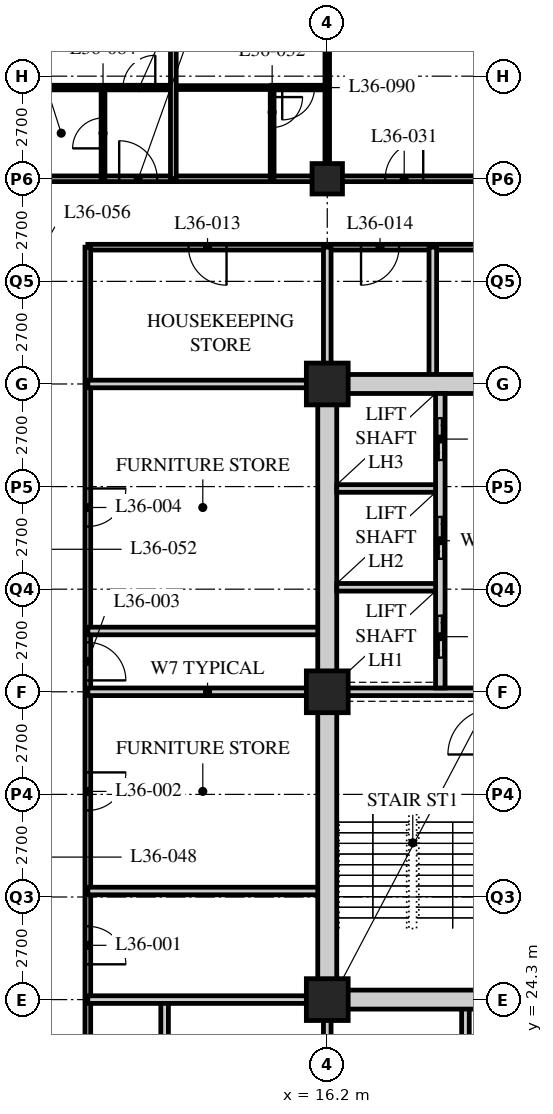
"""IFC4 building model, lengths in metres.
Left out: names, types, materials, properties, quantities, classifications, styles, units other than length and angle.
Written with IfcOpenShell. Run it as: python <this file> out.ifc"""

import sys

from ifc_helpers import new_model, si_unit, direction, frame, frame_2d, origin, origin_2d, place, context, subcontext, project, spatial, rectangle, hollow_rectangle, extrude, element, fill, save


model = new_model("IFC4")
c1 = context("Model", 3, precision=1e-05, world=origin(), true_north=direction((0.0, 1.0)))
c2 = subcontext(c1, "Body", "Model", "MODEL_VIEW")
j1 = project(units=[si_unit("LENGTHUNIT", "METRE"), si_unit("PLANEANGLEUNIT", "RADIAN")], contexts=[c1])
p1 = place(None, origin())
s1 = spatial("IfcSite", under=j1, at=p1, CompositionType="ELEMENT")
p2 = place(p1, origin())
s2 = spatial("IfcBuilding", under=s1, at=p2, CompositionType="ELEMENT")
p3 = place(p2, frame((0.0, 0.0, 140.8)))
s3 = spatial("IfcBuildingStorey", under=s2, at=p3, CompositionType="ELEMENT", Elevation=140.8)
for number, where, z_axis, x_axis in (
    (1, (16.2, 24.3, 0.0), (0.0, 0.0, 1.0), (1.0, 0.0, 0.0)),
    (2, (16.2, 32.4, 0.0), (0.0, 0.0, 1.0), (1.0, 0.0, 0.0)),
    (3, (16.2, 40.5, 0.0), (0.0, 0.0, 1.0), (1.0, 0.0, 0.0)),
):
    element("IfcColumn", number, at=place(p3, frame(where, z_axis=z_axis, x_axis=x_axis)), inside=s3, PredefinedType="COLUMN", context=c2, shape_type="SweptSolid", body=[
        extrude(hollow_rectangle(XDim=1.1, YDim=1.1, WallThickness=0.1, at=origin_2d()), origin(), (0.0, 0.0, 1.0), 3.4),
    ])
p4 = place(p3, frame((16.2, 45.9, 0.0), z_axis=(0.0, 0.0, 1.0), x_axis=(1.0, 0.0, 0.0)))
e4 = element("IfcColumn", 4, at=p4, inside=s3, PredefinedType="COLUMN", context=c2, shape_type="SweptSolid", body=[
    extrude(hollow_rectangle(XDim=0.8, YDim=0.8, WallThickness=0.08, at=origin_2d()), origin(), (0.0, 0.0, 1.0), 3.4),
])
p5 = place(p3, frame((8.1, 45.9, 0.0), z_axis=(0.0, 0.0, 1.0), x_axis=(1.0, 0.0, 0.0)))
e5 = element("IfcWall", 5, at=p5, inside=s3, PredefinedType="PARTITIONING", context=c2, shape_type="SweptSolid", body=[
    extrude(rectangle(XDim=36.45, YDim=0.15, at=frame_2d((18.225, 0.0))), origin(), (0.0, 0.0, 1.0), 2.578),
])
p6 = place(p5, frame((9.625, 0.0, 0.0)))
e6 = element("IfcOpeningElement", 6, at=p6, cuts=e5, PredefinedType="OPENING", context=c2, shape_type="SweptSolid", body=[
    extrude(rectangle(XDim=1.0, YDim=2.1, at=frame_2d((0.5, 1.05))), frame((0.0, 0.085, 0.0), z_axis=(0.0, -1.0, 0.0), x_axis=(1.0, 0.0, 0.0)), (0.0, 0.0, 1.0), 0.17),
])
p7 = place(p5, frame((21.775, 0.0, 0.0)))
e7 = element("IfcOpeningElement", 7, at=p7, cuts=e5, PredefinedType="OPENING", context=c2, shape_type="SweptSolid", body=[
    extrude(rectangle(XDim=1.0, YDim=2.1, at=frame_2d((0.5, 1.05))), frame((0.0, 0.085, 0.0), z_axis=(0.0, -1.0, 0.0), x_axis=(1.0, 0.0, 0.0)), (0.0, 0.0, 1.0), 0.17),
])
p8 = place(p5, frame((28.95, 0.0, 0.0)))
e8 = element("IfcOpeningElement", 8, at=p8, cuts=e5, PredefinedType="OPENING", context=c2, shape_type="SweptSolid", body=[
    extrude(rectangle(XDim=1.0, YDim=2.1, at=frame_2d((0.5, 1.05))), frame((0.0, 0.085, 0.0), z_axis=(0.0, -1.0, 0.0), x_axis=(1.0, 0.0, 0.0)), (0.0, 0.0, 1.0), 0.17),
])
p9 = place(p5, frame((33.925, 0.0, 0.0)))
e9 = element("IfcOpeningElement", 9, at=p9, cuts=e5, PredefinedType="OPENING", context=c2, shape_type="SweptSolid", body=[
    extrude(rectangle(XDim=1.0, YDim=2.1, at=frame_2d((0.5, 1.05))), frame((0.0, 0.085, 0.0), z_axis=(0.0, -1.0, 0.0), x_axis=(1.0, 0.0, 0.0)), (0.0, 0.0, 1.0), 0.17),
])
p10 = place(p5, frame((2.625, 0.0, 0.0)))
e10 = element("IfcOpeningElement", 10, at=p10, cuts=e5, PredefinedType="OPENING", context=c2, shape_type="SweptSolid", body=[
    extrude(rectangle(XDim=1.0, YDim=2.1, at=frame_2d((0.5, 1.05))), frame((0.0, 0.085, 0.0), z_axis=(0.0, -1.0, 0.0), x_axis=(1.0, 0.0, 0.0)), (0.0, 0.0, 1.0), 0.17),
])
p11 = place(p3, frame((27.14, 44.1, 0.0), z_axis=(0.0, 0.0, 1.0), x_axis=(-1.0, 0.0, 0.0)))
e11 = element("IfcWall", 11, at=p11, inside=s3, PredefinedType="PARTITIONING", context=c2, shape_type="SweptSolid", body=[
    extrude(rectangle(XDim=17.24, YDim=0.15, at=frame_2d((8.62, 0.0))), origin(), (0.0, 0.0, 1.0), 3.19),
])
p12 = place(p11, frame((13.59, 0.0, 0.0)))
e12 = element("IfcOpeningElement", 12, at=p12, cuts=e11, PredefinedType="OPENING", context=c2, shape_type="SweptSolid", body=[
    extrude(rectangle(XDim=1.0, YDim=2.1, at=frame_2d((0.5, 1.05))), frame((0.0, 0.085, 0.0), z_axis=(0.0, -1.0, 0.0), x_axis=(1.0, 0.0, 0.0)), (0.0, 0.0, 1.0), 0.17),
])
p13 = place(p11, frame((9.051, 0.0, 0.0)))
e13 = element("IfcOpeningElement", 13, at=p13, cuts=e11, PredefinedType="OPENING", context=c2, shape_type="SweptSolid", body=[
    extrude(rectangle(XDim=1.0, YDim=2.1, at=frame_2d((0.5, 1.05))), frame((0.0, 0.085, 0.0), z_axis=(0.0, -1.0, 0.0), x_axis=(1.0, 0.0, 0.0)), (0.0, 0.0, 1.0), 0.17),
])
p14 = place(p11, frame((3.576, 0.0, 0.0)))
e14 = element("IfcOpeningElement", 14, at=p14, cuts=e11, PredefinedType="OPENING", context=c2, shape_type="SweptSolid", body=[
    extrude(rectangle(XDim=1.0, YDim=2.1, at=frame_2d((0.5, 1.05))), frame((0.0, 0.085, 0.0), z_axis=(0.0, -1.0, 0.0), x_axis=(1.0, 0.0, 0.0)), (0.0, 0.0, 1.0), 0.17),
])
p15 = place(p3, frame((9.9, 44.1, 0.0), z_axis=(0.0, 0.0, 1.0), x_axis=(0.0, -1.0, 0.0)))
e15 = element("IfcWall", 15, at=p15, inside=s3, PredefinedType="PARTITIONING", context=c2, shape_type="SweptSolid", body=[
    extrude(rectangle(XDim=24.75, YDim=0.15, at=frame_2d((12.375, 0.0))), origin(), (0.0, 0.0, 1.0), 3.19),
])
p16 = place(p15, frame((17.871, 0.0, 0.0)))
e16 = element("IfcOpeningElement", 16, at=p16, cuts=e15, PredefinedType="OPENING", context=c2, shape_type="SweptSolid", body=[
    extrude(rectangle(XDim=1.0, YDim=2.1, at=frame_2d((0.5, 1.05))), frame((0.0, 0.085, 0.0), z_axis=(0.0, -1.0, 0.0), x_axis=(1.0, 0.0, 0.0)), (0.0, 0.0, 1.0), 0.17),
])
p17 = place(p15, frame((13.821, 0.0, 0.0)))
e17 = element("IfcOpeningElement", 17, at=p17, cuts=e15, PredefinedType="OPENING", context=c2, shape_type="SweptSolid", body=[
    extrude(rectangle(XDim=1.0, YDim=2.1, at=frame_2d((0.5, 1.05))), frame((0.0, 0.085, 0.0), z_axis=(0.0, -1.0, 0.0), x_axis=(1.0, 0.0, 0.0)), (0.0, 0.0, 1.0), 0.17),
])
p18 = place(p15, frame((10.4, 0.0, 0.0)))
e18 = element("IfcOpeningElement", 18, at=p18, cuts=e15, PredefinedType="OPENING", context=c2, shape_type="SweptSolid", body=[
    extrude(rectangle(XDim=1.0, YDim=2.1, at=frame_2d((0.5, 1.05))), frame((0.0, 0.085, 0.0), z_axis=(0.0, -1.0, 0.0), x_axis=(1.0, 0.0, 0.0)), (0.0, 0.0, 1.0), 0.17),
])
p19 = place(p15, frame((6.35, 0.0, 0.0)))
e19 = element("IfcOpeningElement", 19, at=p19, cuts=e15, PredefinedType="OPENING", context=c2, shape_type="SweptSolid", body=[
    extrude(rectangle(XDim=1.0, YDim=2.1, at=frame_2d((0.5, 1.05))), frame((0.0, 0.085, 0.0), z_axis=(0.0, -1.0, 0.0), x_axis=(1.0, 0.0, 0.0)), (0.0, 0.0, 1.0), 0.17),
])
for number, where, z_axis, x_axis in (
    (20, (9.9, 32.4, 0.0), (0.0, 0.0, 1.0), (1.0, 0.0, 0.0)),
    (21, (9.9, 27.157, 0.0), (0.0, 0.0, 1.0), (1.0, 0.0, 0.0)),
    (22, (9.9, 34.0, 0.0), (0.0, 0.0, 1.0), (1.0, 0.0, 0.0)),
):
    element("IfcWall", number, at=place(p3, frame(where, z_axis=z_axis, x_axis=x_axis)), inside=s3, PredefinedType="SOLIDWALL", context=c2, shape_type="SweptSolid", body=[
        extrude(rectangle(XDim=6.3, YDim=0.2, at=frame_2d((3.15, 0.0))), origin(), (0.0, 0.0, 1.0), 3.19),
    ])
p20 = place(p3, frame((16.2, 19.35, 0.0), z_axis=(0.0, 0.0, 1.0), x_axis=(0.0, 1.0, 0.0)))
e23 = element("IfcWall", 23, at=p20, inside=s3, PredefinedType="SOLIDWALL", context=c2, shape_type="SweptSolid", body=[
    extrude(rectangle(XDim=4.95, YDim=0.2, at=frame_2d((2.475, 0.0))), origin(), (0.0, 0.0, 1.0), 2.49),
])
for number, where, z_axis, x_axis in (
    (24, (11.92, 19.35, 0.0), (0.0, 0.0, 1.0), (0.0, 1.0, 0.0)),
    (25, (19.836, 19.35, 0.0), (0.0, 0.0, 1.0), (0.0, 1.0, 0.0)),
):
    element("IfcWall", number, at=place(p3, frame(where, z_axis=z_axis, x_axis=x_axis)), inside=s3, PredefinedType="SOLIDWALL", context=c2, shape_type="SweptSolid", body=[
        extrude(rectangle(XDim=4.95, YDim=0.2, at=frame_2d((2.475, 0.0))), origin(), (0.0, 0.0, 1.0), 3.19),
    ])
p21 = place(p3, frame((16.2, 40.5, 0.0), z_axis=(0.0, 0.0, 1.0), x_axis=(0.0, 1.0, 0.0)))
e26 = element("IfcWall", 26, at=p21, inside=s3, PredefinedType="SOLIDWALL", context=c2, shape_type="SweptSolid", body=[
    extrude(rectangle(XDim=3.6, YDim=0.2, at=frame_2d((1.8, 0.0))), origin(), (0.0, 0.0, 1.0), 2.578),
])
p22 = place(p3, frame((18.978, 44.1, 0.0), z_axis=(0.0, 0.0, 1.0), x_axis=(0.0, -1.0, 0.0)))
e27 = element("IfcWall", 27, at=p22, inside=s3, PredefinedType="SOLIDWALL", context=c2, shape_type="SweptSolid", body=[
    extrude(rectangle(XDim=3.6, YDim=0.2, at=frame_2d((1.8, 0.0))), origin(), (0.0, 0.0, 1.0), 3.19),
])
for number, where, z_axis, x_axis in (
    (28, (9.9, 24.3, 0.0), (0.0, 0.0, 1.0), (1.0, 0.0, 0.0)),
    (29, (9.9, 40.5, 0.0), (0.0, 0.0, 1.0), (1.0, 0.0, 0.0)),
):
    element("IfcWall", number, at=place(p3, frame(where, z_axis=z_axis, x_axis=x_axis)), inside=s3, PredefinedType="SOLIDWALL", context=c2, shape_type="SweptSolid", body=[
        extrude(rectangle(XDim=6.3, YDim=0.2, at=frame_2d((3.15, 0.0))), origin(), (0.0, 0.0, 1.0), 3.19),
    ])
p23 = place(p3, frame((12.15, 48.3, 0.0), z_axis=(0.0, 0.0, 1.0), x_axis=(1.0, 0.0, 0.0)))
e30 = element("IfcWall", 30, at=p23, inside=s3, PredefinedType="PARTITIONING", context=c2, shape_type="SweptSolid", body=[
    extrude(rectangle(XDim=2.6, YDim=0.1, at=frame_2d((1.3, 0.0))), origin(), (0.0, 0.0, 1.0), 3.19),
])
p24 = place(p3, frame((14.75, 45.9, 0.0), z_axis=(0.0, 0.0, 1.0), x_axis=(0.0, 1.0, 0.0)))
e31 = element("IfcWall", 31, at=p24, inside=s3, PredefinedType="PARTITIONING", context=c2, shape_type="SweptSolid", body=[
    extrude(rectangle(XDim=2.4, YDim=0.1, at=frame_2d((1.2, 0.0))), origin(), (0.0, 0.0, 1.0), 3.19),
])
p25 = place(p24, frame((1.35, 0.0, 0.0)))
e32 = element("IfcOpeningElement", 32, at=p25, cuts=e31, PredefinedType="OPENING", context=c2, shape_type="SweptSolid", body=[
    extrude(rectangle(XDim=0.8, YDim=2.1, at=frame_2d((0.4, 1.05))), frame((0.0, 0.06, 0.0), z_axis=(0.0, -1.0, 0.0), x_axis=(1.0, 0.0, 0.0)), (0.0, 0.0, 1.0), 0.12),
])
p26 = place(p3, frame((16.2, 45.9, 0.0), z_axis=(0.0, 0.0, 1.0), x_axis=(0.0, 1.0, 0.0)))
e33 = element("IfcWall", 33, at=p26, inside=s3, PredefinedType="PARTITIONING", context=c2, shape_type="SweptSolid", body=[
    extrude(rectangle(XDim=7.8, YDim=0.12, at=frame_2d((3.9, 0.0))), origin(), (0.0, 0.0, 1.0), 2.578),
])
p27 = place(p26, frame((4.825, 0.0, 0.0)))
e34 = element("IfcOpeningElement", 34, at=p27, cuts=e33, PredefinedType="OPENING", context=c2, shape_type="SweptSolid", body=[
    extrude(rectangle(XDim=0.85, YDim=2.1, at=frame_2d((0.425, 1.05))), frame((0.0, 0.07, 0.0), z_axis=(0.0, -1.0, 0.0), x_axis=(1.0, 0.0, 0.0)), (0.0, 0.0, 1.0), 0.14),
])
p28 = place(p3, frame((8.1, 48.3, 0.0), z_axis=(0.0, 0.0, 1.0), x_axis=(1.0, 0.0, 0.0)))
e35 = element("IfcWall", 35, at=p28, inside=s3, PredefinedType="PARTITIONING", context=c2, shape_type="SweptSolid", body=[
    extrude(rectangle(XDim=4.05, YDim=0.12, at=frame_2d((2.025, 0.0))), origin(), (0.0, 0.0, 1.0), 3.19),
])
p29 = place(p28, frame((2.725, 0.0, 0.0)))
e36 = element("IfcOpeningElement", 36, at=p29, cuts=e35, PredefinedType="OPENING", context=c2, shape_type="SweptSolid", body=[
    extrude(rectangle(XDim=0.85, YDim=2.1, at=frame_2d((0.425, 1.05))), frame((0.0, 0.07, 0.0), z_axis=(0.0, -1.0, 0.0), x_axis=(1.0, 0.0, 0.0)), (0.0, 0.0, 1.0), 0.14),
])
p30 = place(p3, frame((10.3, 45.9, 0.0), z_axis=(0.0, 0.0, 1.0), x_axis=(0.0, 1.0, 0.0)))
e37 = element("IfcWall", 37, at=p30, inside=s3, PredefinedType="PARTITIONING", context=c2, shape_type="SweptSolid", body=[
    extrude(rectangle(XDim=2.4, YDim=0.1, at=frame_2d((1.2, 0.0))), origin(), (0.0, 0.0, 1.0), 3.19),
])
p31 = place(p30, frame((0.8, 0.0, 0.0)))
e38 = element("IfcOpeningElement", 38, at=p31, cuts=e37, PredefinedType="OPENING", context=c2, shape_type="SweptSolid", body=[
    extrude(rectangle(XDim=0.8, YDim=2.1, at=frame_2d((0.4, 1.05))), frame((0.0, 0.06, 0.0), z_axis=(0.0, -1.0, 0.0), x_axis=(1.0, 0.0, 0.0)), (0.0, 0.0, 1.0), 0.12),
])
p32 = place(p3, frame((12.15, 45.9, 0.0), z_axis=(0.0, 0.0, 1.0), x_axis=(0.0, 1.0, 0.0)))
e39 = element("IfcWall", 39, at=p32, inside=s3, PredefinedType="PARTITIONING", context=c2, shape_type="SweptSolid", body=[
    extrude(rectangle(XDim=7.8, YDim=0.15, at=frame_2d((3.9, 0.0))), origin(), (0.0, 0.0, 1.0), 3.19),
])
p33 = place(p3, frame((14.74, 48.3, 0.0), z_axis=(0.0, 0.0, 1.0), x_axis=(1.0, 0.0, 0.0)))
e40 = element("IfcWall", 40, at=p33, inside=s3, PredefinedType="PARTITIONING", context=c2, shape_type="SweptSolid", body=[
    extrude(rectangle(XDim=1.46, YDim=0.12, at=frame_2d((0.73, 0.0))), origin(), (0.0, 0.0, 1.0), 3.19),
])
p34 = place(p33, frame((0.275, 0.0, 0.0)))
e41 = element("IfcOpeningElement", 41, at=p34, cuts=e40, PredefinedType="OPENING", context=c2, shape_type="SweptSolid", body=[
    extrude(rectangle(XDim=0.85, YDim=2.1, at=frame_2d((0.425, 1.05))), frame((0.0, 0.07, 0.0), z_axis=(0.0, -1.0, 0.0), x_axis=(1.0, 0.0, 0.0)), (0.0, 0.0, 1.0), 0.14),
])
p35 = place(p3, frame((15.95, 24.3, 0.0), z_axis=(0.0, 0.0, 1.0), x_axis=(1.0, 0.0, 0.0)))
e42 = element("IfcWall", 42, at=p35, inside=s3, PredefinedType="SOLIDWALL", context=c2, shape_type="SweptSolid", body=[
    extrude(rectangle(XDim=24.8, YDim=0.5, at=frame_2d((12.4, 0.0))), origin(), (0.0, 0.0, 1.0), 2.54),
])
p36 = place(p35, frame((11.5, 0.0, 0.0)))
e43 = element("IfcOpeningElement", 43, at=p36, cuts=e42, PredefinedType="OPENING", context=c2, shape_type="SweptSolid", body=[
    extrude(rectangle(XDim=1.8, YDim=2.4, at=frame_2d((0.9, 1.2))), frame((0.0, 0.26, 0.0), z_axis=(0.0, -1.0, 0.0), x_axis=(1.0, 0.0, 0.0)), (0.0, 0.0, 1.0), 0.52),
])
p37 = place(p3, frame((15.95, 40.5, 0.0), z_axis=(0.0, 0.0, 1.0), x_axis=(1.0, 0.0, 0.0)))
e44 = element("IfcWall", 44, at=p37, inside=s3, PredefinedType="SOLIDWALL", context=c2, shape_type="SweptSolid", body=[
    extrude(rectangle(XDim=24.8, YDim=0.5, at=frame_2d((12.4, 0.0))), origin(), (0.0, 0.0, 1.0), 2.54),
])
p38 = place(p37, frame((11.5, 0.0, 0.0)))
e45 = element("IfcOpeningElement", 45, at=p38, cuts=e44, PredefinedType="OPENING", context=c2, shape_type="SweptSolid", body=[
    extrude(rectangle(XDim=1.8, YDim=2.4, at=frame_2d((0.9, 1.2))), frame((0.0, 0.26, 0.0), z_axis=(0.0, -1.0, 0.0), x_axis=(1.0, 0.0, 0.0)), (0.0, 0.0, 1.0), 0.52),
])
p39 = place(p3, frame((16.2, 24.55, 0.0), z_axis=(0.0, 0.0, 1.0), x_axis=(0.0, 1.0, 0.0)))
e46 = element("IfcWall", 46, at=p39, inside=s3, PredefinedType="SOLIDWALL", context=c2, shape_type="SweptSolid", body=[
    extrude(rectangle(XDim=15.7, YDim=0.5, at=frame_2d((7.85, 0.0))), origin(), (0.0, 0.0, 1.0), 2.578),
])
p40 = place(p3, frame((16.45, 32.4, 0.0), z_axis=(0.0, 0.0, 1.0), x_axis=(1.0, 0.0, 0.0)))
e47 = element("IfcWall", 47, at=p40, inside=s3, PredefinedType="SOLIDWALL", context=c2, shape_type="SweptSolid", body=[
    extrude(rectangle(XDim=7.95, YDim=0.2, at=frame_2d((3.975, 0.0))), origin(), (0.0, 0.0, 1.0), 2.578),
])
p41 = place(p3, frame((19.175, 32.5, 0.0), z_axis=(0.0, 0.0, 1.0), x_axis=(0.0, 1.0, 0.0)))
e48 = element("IfcWall", 48, at=p41, inside=s3, PredefinedType="SOLIDWALL", context=c2, shape_type="SweptSolid", body=[
    extrude(rectangle(XDim=7.75, YDim=0.25, at=frame_2d((3.875, 0.0))), origin(), (0.0, 0.0, 1.0), 3.19),
])
p42 = place(p41, frame((0.8, 0.0, 0.0)))
e49 = element("IfcOpeningElement", 49, at=p42, cuts=e48, PredefinedType="OPENING", context=c2, shape_type="SweptSolid", body=[
    extrude(rectangle(XDim=1.1, YDim=2.4, at=frame_2d((0.55, 1.2))), frame((0.0, 0.135, 0.0), z_axis=(0.0, -1.0, 0.0), x_axis=(1.0, 0.0, 0.0)), (0.0, 0.0, 1.0), 0.27),
])
p43 = place(p41, frame((3.4, 0.0, 0.0)))
e50 = element("IfcOpeningElement", 50, at=p43, cuts=e48, PredefinedType="OPENING", context=c2, shape_type="SweptSolid", body=[
    extrude(rectangle(XDim=1.1, YDim=2.4, at=frame_2d((0.55, 1.2))), frame((0.0, 0.135, 0.0), z_axis=(0.0, -1.0, 0.0), x_axis=(1.0, 0.0, 0.0)), (0.0, 0.0, 1.0), 0.27),
])
p44 = place(p41, frame((6.0, 0.0, 0.0)))
e51 = element("IfcOpeningElement", 51, at=p44, cuts=e48, PredefinedType="OPENING", context=c2, shape_type="SweptSolid", body=[
    extrude(rectangle(XDim=1.1, YDim=2.4, at=frame_2d((0.55, 1.2))), frame((0.0, 0.135, 0.0), z_axis=(0.0, -1.0, 0.0), x_axis=(1.0, 0.0, 0.0)), (0.0, 0.0, 1.0), 0.27),
])
for number, where, z_axis, x_axis in (
    (52, (16.45, 35.15, 0.0), (0.0, 0.0, 1.0), (1.0, 0.0, 0.0)),
    (53, (16.45, 37.75, 0.0), (0.0, 0.0, 1.0), (1.0, 0.0, 0.0)),
):
    element("IfcWall", number, at=place(p3, frame(where, z_axis=z_axis, x_axis=x_axis)), inside=s3, PredefinedType="SOLIDWALL", context=c2, shape_type="SweptSolid", body=[
        extrude(rectangle(XDim=2.6, YDim=0.2, at=frame_2d((1.3, 0.0))), origin(), (0.0, 0.0, 1.0), 3.19),
    ])
p45 = place(p16, origin())
e54 = element("IfcDoor", 54, at=p45, inside=s3, OperationType="SINGLE_SWING_RIGHT", PredefinedType="DOOR", context=c2, shape_type="SweptSolid", body=[
    extrude(rectangle(XDim=1.0, YDim=2.1, at=frame_2d((0.5, 1.05))), frame((0.0, 0.025, 0.0), z_axis=(0.0, -1.0, 0.0), x_axis=(1.0, 0.0, 0.0)), (0.0, 0.0, 1.0), 0.05),
])
fill(e16, e54)
p46 = place(p17, origin())
e55 = element("IfcDoor", 55, at=p46, inside=s3, OperationType="SINGLE_SWING_LEFT", PredefinedType="DOOR", context=c2, shape_type="SweptSolid", body=[
    extrude(rectangle(XDim=1.0, YDim=2.1, at=frame_2d((0.5, 1.05))), frame((0.0, 0.025, 0.0), z_axis=(0.0, -1.0, 0.0), x_axis=(1.0, 0.0, 0.0)), (0.0, 0.0, 1.0), 0.05),
])
fill(e17, e55)
p47 = place(p18, origin())
e56 = element("IfcDoor", 56, at=p47, inside=s3, OperationType="SINGLE_SWING_RIGHT", PredefinedType="DOOR", context=c2, shape_type="SweptSolid", body=[
    extrude(rectangle(XDim=1.0, YDim=2.1, at=frame_2d((0.5, 1.05))), frame((0.0, 0.025, 0.0), z_axis=(0.0, -1.0, 0.0), x_axis=(1.0, 0.0, 0.0)), (0.0, 0.0, 1.0), 0.05),
])
fill(e18, e56)
p48 = place(p19, origin())
e57 = element("IfcDoor", 57, at=p48, inside=s3, OperationType="SINGLE_SWING_LEFT", PredefinedType="DOOR", context=c2, shape_type="SweptSolid", body=[
    extrude(rectangle(XDim=1.0, YDim=2.1, at=frame_2d((0.5, 1.05))), frame((0.0, 0.025, 0.0), z_axis=(0.0, -1.0, 0.0), x_axis=(1.0, 0.0, 0.0)), (0.0, 0.0, 1.0), 0.05),
])
fill(e19, e57)
p49 = place(p12, origin())
e58 = element("IfcDoor", 58, at=p49, inside=s3, OperationType="SINGLE_SWING_LEFT", PredefinedType="DOOR", context=c2, shape_type="SweptSolid", body=[
    extrude(rectangle(XDim=1.0, YDim=2.1, at=frame_2d((0.5, 1.05))), frame((0.0, 0.025, 0.0), z_axis=(0.0, -1.0, 0.0), x_axis=(1.0, 0.0, 0.0)), (0.0, 0.0, 1.0), 0.05),
])
fill(e12, e58)
p50 = place(p13, origin())
e59 = element("IfcDoor", 59, at=p50, inside=s3, OperationType="SINGLE_SWING_RIGHT", PredefinedType="DOOR", context=c2, shape_type="SweptSolid", body=[
    extrude(rectangle(XDim=1.0, YDim=2.1, at=frame_2d((0.5, 1.05))), frame((0.0, 0.025, 0.0), z_axis=(0.0, -1.0, 0.0), x_axis=(1.0, 0.0, 0.0)), (0.0, 0.0, 1.0), 0.05),
])
fill(e13, e59)
p51 = place(p6, origin())
e60 = element("IfcDoor", 60, at=p51, inside=s3, OperationType="SINGLE_SWING_RIGHT", PredefinedType="DOOR", context=c2, shape_type="SweptSolid", body=[
    extrude(rectangle(XDim=1.0, YDim=2.1, at=frame_2d((0.5, 1.05))), frame((0.0, 0.025, 0.0), z_axis=(0.0, -1.0, 0.0), x_axis=(1.0, 0.0, 0.0)), (0.0, 0.0, 1.0), 0.05),
])
fill(e6, e60)
p52 = place(p25, origin())
e61 = element("IfcDoor", 61, at=p52, inside=s3, OperationType="SINGLE_SWING_LEFT", PredefinedType="DOOR", context=c2, shape_type="SweptSolid", body=[
    extrude(rectangle(XDim=0.8, YDim=2.1, at=frame_2d((0.4, 1.05))), frame((0.0, 0.025, 0.0), z_axis=(0.0, -1.0, 0.0), x_axis=(1.0, 0.0, 0.0)), (0.0, 0.0, 1.0), 0.05),
])
fill(e32, e61)
p53 = place(p31, origin())
e62 = element("IfcDoor", 62, at=p53, inside=s3, OperationType="SINGLE_SWING_LEFT", PredefinedType="DOOR", context=c2, shape_type="SweptSolid", body=[
    extrude(rectangle(XDim=0.8, YDim=2.1, at=frame_2d((0.4, 1.05))), frame((0.0, 0.025, 0.0), z_axis=(0.0, -1.0, 0.0), x_axis=(1.0, 0.0, 0.0)), (0.0, 0.0, 1.0), 0.05),
])
fill(e38, e62)
p54 = place(p10, origin())
e63 = element("IfcDoor", 63, at=p54, inside=s3, OperationType="SINGLE_SWING_LEFT", PredefinedType="DOOR", context=c2, shape_type="SweptSolid", body=[
    extrude(rectangle(XDim=1.0, YDim=2.1, at=frame_2d((0.5, 1.05))), frame((0.0, 0.025, 0.0), z_axis=(0.0, -1.0, 0.0), x_axis=(1.0, 0.0, 0.0)), (0.0, 0.0, 1.0), 0.05),
])
fill(e10, e63)
p55 = place(p29, origin())
e64 = element("IfcDoor", 64, at=p55, inside=s3, OperationType="SINGLE_SWING_RIGHT", PredefinedType="DOOR", context=c2, shape_type="SweptSolid", body=[
    extrude(rectangle(XDim=0.85, YDim=2.1, at=frame_2d((0.425, 1.05))), frame((0.0, 0.025, 0.0), z_axis=(0.0, -1.0, 0.0), x_axis=(1.0, 0.0, 0.0)), (0.0, 0.0, 1.0), 0.05),
])
fill(e36, e64)
p56 = place(p34, origin())
e65 = element("IfcDoor", 65, at=p56, inside=s3, OperationType="SINGLE_SWING_RIGHT", PredefinedType="DOOR", context=c2, shape_type="SweptSolid", body=[
    extrude(rectangle(XDim=0.85, YDim=2.1, at=frame_2d((0.425, 1.05))), frame((0.0, 0.025, 0.0), z_axis=(0.0, -1.0, 0.0), x_axis=(1.0, 0.0, 0.0)), (0.0, 0.0, 1.0), 0.05),
])
fill(e41, e65)
p57 = place(p42, origin())
e66 = element("IfcDoor", 66, at=p57, inside=s3, OperationType="DOUBLE_DOOR_SLIDING", PredefinedType="DOOR", context=c2, shape_type="SweptSolid", body=[
    extrude(rectangle(XDim=1.1, YDim=2.4, at=frame_2d((0.55, 1.2))), frame((0.0, 0.025, 0.0), z_axis=(0.0, -1.0, 0.0), x_axis=(1.0, 0.0, 0.0)), (0.0, 0.0, 1.0), 0.05),
])
fill(e49, e66)
p58 = place(p43, origin())
e67 = element("IfcDoor", 67, at=p58, inside=s3, OperationType="DOUBLE_DOOR_SLIDING", PredefinedType="DOOR", context=c2, shape_type="SweptSolid", body=[
    extrude(rectangle(XDim=1.1, YDim=2.4, at=frame_2d((0.55, 1.2))), frame((0.0, 0.025, 0.0), z_axis=(0.0, -1.0, 0.0), x_axis=(1.0, 0.0, 0.0)), (0.0, 0.0, 1.0), 0.05),
])
fill(e50, e67)
p59 = place(p44, origin())
e68 = element("IfcDoor", 68, at=p59, inside=s3, OperationType="DOUBLE_DOOR_SLIDING", PredefinedType="DOOR", context=c2, shape_type="SweptSolid", body=[
    extrude(rectangle(XDim=1.1, YDim=2.4, at=frame_2d((0.55, 1.2))), frame((0.0, 0.025, 0.0), z_axis=(0.0, -1.0, 0.0), x_axis=(1.0, 0.0, 0.0)), (0.0, 0.0, 1.0), 0.05),
])
fill(e51, e68)
save(model, sys.argv[1])
